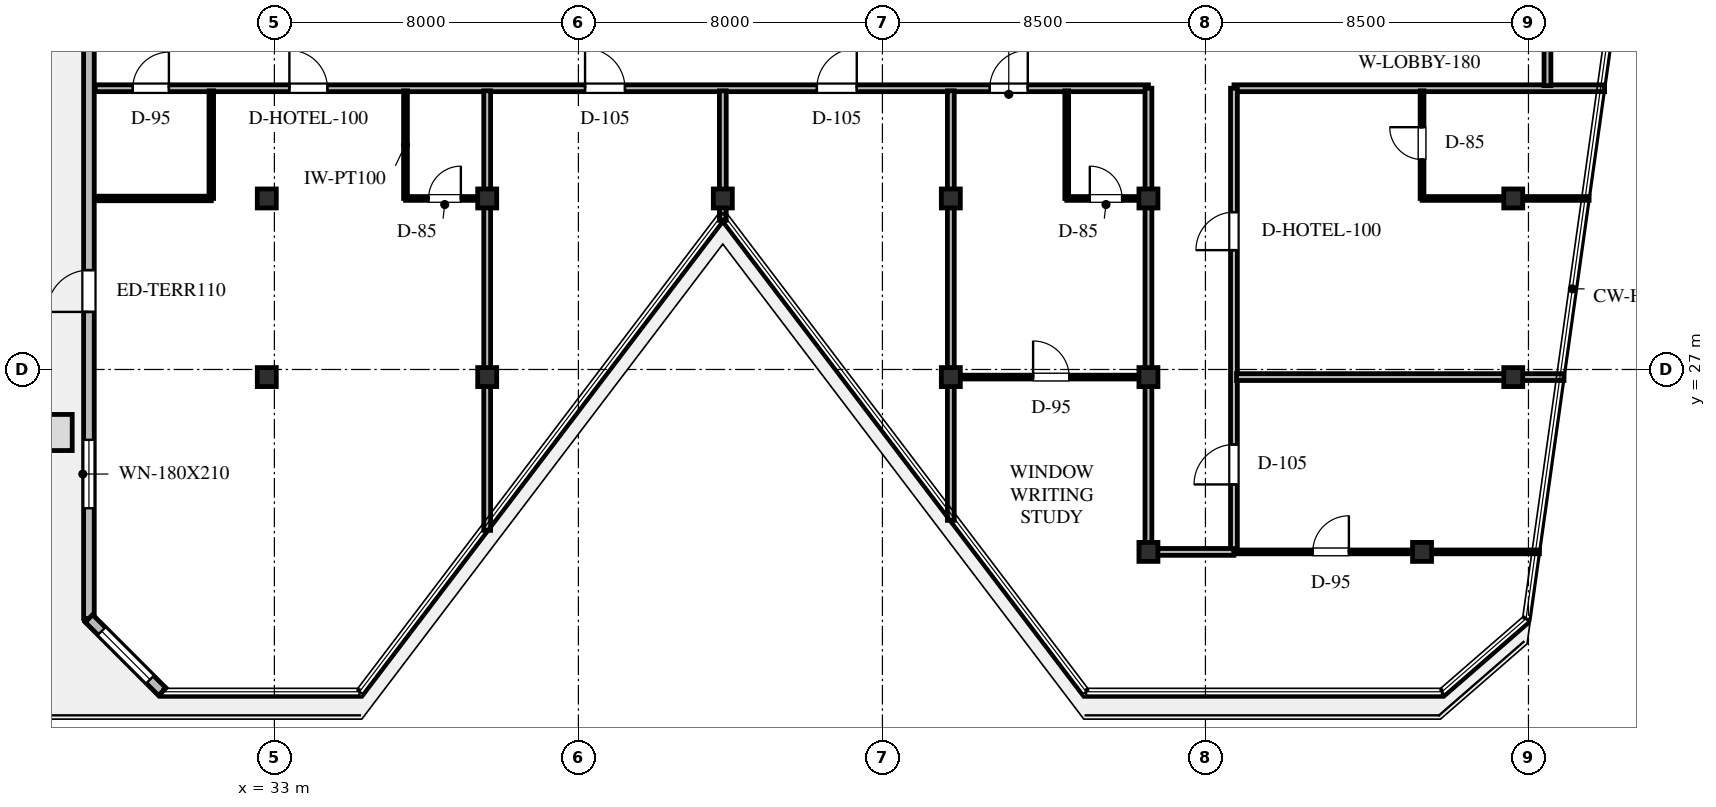
"""IFC4 building model, lengths in metres.
Left out: names, types, materials, properties, quantities, classifications, styles, units other than length and angle.
Written with IfcOpenShell. Run it as: python <this file> out.ifc"""

import sys

from ifc_helpers import new_model, si_unit, direction, frame, frame_2d, origin, origin_2d, place, context, subcontext, project, spatial, rectangle, hollow_rectangle, extrude, element, fill, save


model = new_model("IFC4")
c1 = context("Model", 3, precision=1e-05, world=origin(), true_north=direction((0.0, 1.0)))
c2 = subcontext(c1, "Body", "Model", "MODEL_VIEW")
j1 = project(units=[si_unit("LENGTHUNIT", "METRE"), si_unit("PLANEANGLEUNIT", "RADIAN")], contexts=[c1])
p1 = place(None, origin())
s1 = spatial("IfcSite", under=j1, at=p1, CompositionType="ELEMENT")
p2 = place(p1, origin())
s2 = spatial("IfcBuilding", under=s1, at=p2, CompositionType="ELEMENT")
p3 = place(p2, frame((0.0, 0.0, 263.4)))
s3 = spatial("IfcBuildingStorey", under=s2, at=p3, CompositionType="ELEMENT", Elevation=263.4)
for number, where, z_axis, x_axis in (
    (1, (44.8, 31.5, 0.0), (0.0, 0.0, 1.0), (1.0, 0.0, 0.0)),
    (2, (50.8, 31.5, 0.0), (0.0, 0.0, 1.0), (1.0, 0.0, 0.0)),
    (3, (56.0, 31.5, 0.0), (0.0, 0.0, 1.0), (1.0, 0.0, 0.0)),
    (4, (65.6, 31.5, 0.0), (0.0, 0.0, 1.0), (1.0, 0.0, 0.0)),
    (5, (38.6, 31.5, 0.0), (0.0, 0.0, 1.0), (1.0, 0.0, 0.0)),
    (6, (32.8, 31.5, 0.0), (0.0, 0.0, 1.0), (1.0, 0.0, 0.0)),
    (7, (38.6, 26.8, 0.0), (0.0, 0.0, 1.0), (1.0, 0.0, 0.0)),
    (8, (50.8, 26.8, 0.0), (0.0, 0.0, 1.0), (1.0, 0.0, 0.0)),
    (9, (56.0, 26.8, 0.0), (0.0, 0.0, 1.0), (1.0, 0.0, 0.0)),
    (10, (65.6, 26.8, 0.0), (0.0, 0.0, 1.0), (1.0, 0.0, 0.0)),
    (11, (56.0, 22.2, 0.0), (0.0, 0.0, 1.0), (1.0, 0.0, 0.0)),
    (12, (63.2, 22.2, 0.0), (0.0, 0.0, 1.0), (1.0, 0.0, 0.0)),
    (13, (32.8, 26.8, 0.0), (0.0, 0.0, 1.0), (1.0, 0.0, 0.0)),
):
    element("IfcColumn", number, at=place(p3, frame(where, z_axis=z_axis, x_axis=x_axis)), inside=s3, PredefinedType="COLUMN", context=c2, shape_type="SweptSolid", body=[
        extrude(hollow_rectangle(XDim=0.5, YDim=0.5, WallThickness=0.02, at=origin_2d()), origin(), (0.0, 0.0, 1.0), 3.6),
    ])
p4 = place(p3, frame((28.12, 20.45, 0.0), z_axis=(0.0, 0.0, 1.0), x_axis=(0.0, 1.0, 0.0)))
e14 = element("IfcWall", 14, at=p4, inside=s3, PredefinedType="STANDARD", context=c2, shape_type="SweptSolid", body=[
    extrude(rectangle(XDim=17.35, YDim=0.28, at=frame_2d((8.675, 0.0))), origin(), (0.0, 0.0, 1.0), 3.36),
])
p5 = place(p4, frame((8.065, 0.0, 0.0)))
e15 = element("IfcOpeningElement", 15, at=p5, cuts=e14, PredefinedType="OPENING", context=c2, shape_type="SweptSolid", body=[
    extrude(rectangle(XDim=1.1, YDim=2.2, at=frame_2d((0.55, 1.1))), frame((0.0, 0.15, 0.0), z_axis=(0.0, -1.0, 0.0), x_axis=(1.0, 0.0, 0.0)), (0.0, 0.0, 1.0), 0.3),
])
p6 = place(p4, frame((2.899, 0.0, 0.65)))
e16 = element("IfcOpeningElement", 16, at=p6, cuts=e14, PredefinedType="OPENING", context=c2, shape_type="SweptSolid", body=[
    extrude(rectangle(XDim=1.8, YDim=2.1, at=frame_2d((0.9, 1.05))), frame((0.0, 0.15, 0.0), z_axis=(0.0, -1.0, 0.0), x_axis=(1.0, 0.0, 0.0)), (0.0, 0.0, 1.0), 0.3),
])
p7 = place(p3, frame((30.05, 18.52, 0.0), z_axis=(0.0, 0.0, 1.0), x_axis=(-0.707106781187, 0.707106781187, 0.0)))
e17 = element("IfcWall", 17, at=p7, inside=s3, PredefinedType="STANDARD", context=c2, shape_type="SweptSolid", body=[
    extrude(rectangle(XDim=2.729, YDim=0.28, at=frame_2d((1.365, 0.0))), origin(), (0.0, 0.0, 1.0), 3.36),
])
p8 = place(p7, frame((0.455, 0.0, 0.65)))
e18 = element("IfcOpeningElement", 18, at=p8, cuts=e17, PredefinedType="OPENING", context=c2, shape_type="SweptSolid", body=[
    extrude(rectangle(XDim=1.8, YDim=2.1, at=frame_2d((0.9, 1.05))), frame((0.0, 0.15, 0.0), z_axis=(0.0, -1.0, 0.0), x_axis=(1.0, 0.0, 0.0)), (0.0, 0.0, 1.0), 0.3),
])
p9 = place(p3, frame((28.285, 34.4, 0.0), z_axis=(0.0, 0.0, 1.0), x_axis=(1.0, 0.0, 0.0)))
e19 = element("IfcWall", 19, at=p9, inside=s3, PredefinedType="STANDARD", context=c2, shape_type="SweptSolid", body=[
    extrude(rectangle(XDim=27.715, YDim=0.18, at=frame_2d((13.857, 0.0))), origin(), (0.0, 0.0, 1.0), 2.664),
])
p10 = place(p9, frame((0.989, 0.0, 0.0)))
e20 = element("IfcOpeningElement", 20, at=p10, cuts=e19, PredefinedType="OPENING", context=c2, shape_type="SweptSolid", body=[
    extrude(rectangle(XDim=0.95, YDim=2.15, at=frame_2d((0.475, 1.075))), frame((0.0, 0.1, 0.0), z_axis=(0.0, -1.0, 0.0), x_axis=(1.0, 0.0, 0.0)), (0.0, 0.0, 1.0), 0.2),
])
p11 = place(p9, frame((5.11, 0.0, 0.0)))
e21 = element("IfcOpeningElement", 21, at=p11, cuts=e19, PredefinedType="OPENING", context=c2, shape_type="SweptSolid", body=[
    extrude(rectangle(XDim=1.0, YDim=2.15, at=frame_2d((0.5, 1.075))), frame((0.0, 0.1, 0.0), z_axis=(0.0, -1.0, 0.0), x_axis=(1.0, 0.0, 0.0)), (0.0, 0.0, 1.0), 0.2),
])
p12 = place(p9, frame((12.89, 0.0, 0.0)))
e22 = element("IfcOpeningElement", 22, at=p12, cuts=e19, PredefinedType="OPENING", context=c2, shape_type="SweptSolid", body=[
    extrude(rectangle(XDim=1.05, YDim=2.2, at=frame_2d((0.525, 1.1))), frame((0.0, 0.1, 0.0), z_axis=(0.0, -1.0, 0.0), x_axis=(1.0, 0.0, 0.0)), (0.0, 0.0, 1.0), 0.2),
])
p13 = place(p9, frame((18.99, 0.0, 0.0)))
e23 = element("IfcOpeningElement", 23, at=p13, cuts=e19, PredefinedType="OPENING", context=c2, shape_type="SweptSolid", body=[
    extrude(rectangle(XDim=1.05, YDim=2.2, at=frame_2d((0.525, 1.1))), frame((0.0, 0.1, 0.0), z_axis=(0.0, -1.0, 0.0), x_axis=(1.0, 0.0, 0.0)), (0.0, 0.0, 1.0), 0.2),
])
p14 = place(p9, frame((23.54, 0.0, 0.0)))
e24 = element("IfcOpeningElement", 24, at=p14, cuts=e19, PredefinedType="OPENING", context=c2, shape_type="SweptSolid", body=[
    extrude(rectangle(XDim=1.0, YDim=2.15, at=frame_2d((0.5, 1.075))), frame((0.0, 0.1, 0.0), z_axis=(0.0, -1.0, 0.0), x_axis=(1.0, 0.0, 0.0)), (0.0, 0.0, 1.0), 0.2),
])
p15 = place(p3, frame((58.25, 34.4, 0.0), z_axis=(0.0, 0.0, 1.0), x_axis=(1.0, 0.0, 0.0)))
e25 = element("IfcWall", 25, at=p15, inside=s3, PredefinedType="STANDARD", context=c2, shape_type="SweptSolid", body=[
    extrude(rectangle(XDim=9.753, YDim=0.18, at=frame_2d((4.877, 0.0))), origin(), (0.0, 0.0, 1.0), 3.36),
])
p16 = place(p3, frame((66.5, 34.468, 0.0), z_axis=(0.0, 0.0, 1.0), x_axis=(0.0, 1.0, 0.0)))
e26 = element("IfcWall", 26, at=p16, inside=s3, PredefinedType="STANDARD", context=c2, shape_type="SweptSolid", body=[
    extrude(rectangle(XDim=3.582, YDim=0.18, at=frame_2d((1.791, 0.0))), origin(), (0.0, 0.0, 1.0), 2.664),
])
p17 = place(p3, frame((56.0, 22.2, 0.0), z_axis=(0.0, 0.0, 1.0), x_axis=(0.0, 1.0, 0.0)))
e27 = element("IfcWall", 27, at=p17, inside=s3, PredefinedType="STANDARD", context=c2, shape_type="SweptSolid", body=[
    extrude(rectangle(XDim=12.2, YDim=0.18, at=frame_2d((6.1, 0.0))), origin(), (0.0, 0.0, 1.0), 2.664),
])
p18 = place(p3, frame((58.25, 22.2, 0.0), z_axis=(0.0, 0.0, 1.0), x_axis=(0.0, 1.0, 0.0)))
e28 = element("IfcWall", 28, at=p18, inside=s3, PredefinedType="STANDARD", context=c2, shape_type="SweptSolid", body=[
    extrude(rectangle(XDim=12.2, YDim=0.18, at=frame_2d((6.1, 0.0))), origin(), (0.0, 0.0, 1.0), 2.664),
])
p19 = place(p18, frame((1.775, 0.0, 0.0)))
e29 = element("IfcOpeningElement", 29, at=p19, cuts=e28, PredefinedType="OPENING", context=c2, shape_type="SweptSolid", body=[
    extrude(rectangle(XDim=1.05, YDim=2.2, at=frame_2d((0.525, 1.1))), frame((0.0, 0.1, 0.0), z_axis=(0.0, -1.0, 0.0), x_axis=(1.0, 0.0, 0.0)), (0.0, 0.0, 1.0), 0.2),
])
p20 = place(p18, frame((7.94, 0.0, 0.0)))
e30 = element("IfcOpeningElement", 30, at=p20, cuts=e28, PredefinedType="OPENING", context=c2, shape_type="SweptSolid", body=[
    extrude(rectangle(XDim=1.0, YDim=2.15, at=frame_2d((0.5, 1.075))), frame((0.0, 0.1, 0.0), z_axis=(0.0, -1.0, 0.0), x_axis=(1.0, 0.0, 0.0)), (0.0, 0.0, 1.0), 0.2),
])
p21 = place(p3, frame((56.0, 22.2, 0.0), z_axis=(0.0, 0.0, 1.0), x_axis=(1.0, 0.0, 0.0)))
e31 = element("IfcWall", 31, at=p21, inside=s3, PredefinedType="STANDARD", context=c2, shape_type="SweptSolid", body=[
    extrude(rectangle(XDim=2.25, YDim=0.18, at=frame_2d((1.125, 0.0))), origin(), (0.0, 0.0, 1.0), 2.664),
])
p22 = place(p3, frame((31.34, 31.5, 0.0), z_axis=(0.0, 0.0, 1.0), x_axis=(0.0, 1.0, 0.0)))
e32 = element("IfcWall", 32, at=p22, inside=s3, PredefinedType="PARTITIONING", context=c2, shape_type="SweptSolid", body=[
    extrude(rectangle(XDim=2.832, YDim=0.12, at=frame_2d((1.416, 0.0))), origin(), (0.0, 0.0, 1.0), 3.36),
])
p23 = place(p3, frame((28.285, 31.5, 0.0), z_axis=(0.0, 0.0, 1.0), x_axis=(1.0, 0.0, 0.0)))
e33 = element("IfcWall", 33, at=p23, inside=s3, PredefinedType="PARTITIONING", context=c2, shape_type="SweptSolid", body=[
    extrude(rectangle(XDim=3.055, YDim=0.12, at=frame_2d((1.528, 0.0))), origin(), (0.0, 0.0, 1.0), 3.36),
])
p24 = place(p3, frame((58.318, 26.8, 0.0), z_axis=(0.0, 0.0, 1.0), x_axis=(1.0, 0.0, 0.0)))
e34 = element("IfcWall", 34, at=p24, inside=s3, PredefinedType="STANDARD", context=c2, shape_type="SweptSolid", body=[
    extrude(rectangle(XDim=8.617, YDim=0.18, at=frame_2d((4.309, 0.0))), origin(), (0.0, 0.0, 1.0), 2.664),
])
p25 = place(p3, frame((58.25, 22.2, 0.0), z_axis=(0.0, 0.0, 1.0), x_axis=(1.0, 0.0, 0.0)))
e35 = element("IfcWall", 35, at=p25, inside=s3, PredefinedType="PARTITIONING", context=c2, shape_type="SweptSolid", body=[
    extrude(rectangle(XDim=8.039, YDim=0.1, at=frame_2d((4.02, 0.0))), origin(), (0.0, 0.0, 1.0), 2.664),
])
p26 = place(p25, frame((2.075, 0.0, 0.0)))
e36 = element("IfcOpeningElement", 36, at=p26, cuts=e35, PredefinedType="OPENING", context=c2, shape_type="SweptSolid", body=[
    extrude(rectangle(XDim=0.95, YDim=2.15, at=frame_2d((0.475, 1.075))), frame((0.0, 0.06, 0.0), z_axis=(0.0, -1.0, 0.0), x_axis=(1.0, 0.0, 0.0)), (0.0, 0.0, 1.0), 0.12),
])
p27 = place(p3, frame((63.2, 31.5, 0.0), z_axis=(0.0, 0.0, 1.0), x_axis=(1.0, 0.0, 0.0)))
e37 = element("IfcWall", 37, at=p27, inside=s3, PredefinedType="PARTITIONING", context=c2, shape_type="SweptSolid", body=[
    extrude(rectangle(XDim=4.396, YDim=0.1, at=frame_2d((2.198, 0.0))), origin(), (0.0, 0.0, 1.0), 2.664),
])
p28 = place(p3, frame((63.2, 31.5, 0.0), z_axis=(0.0, 0.0, 1.0), x_axis=(0.0, 1.0, 0.0)))
e38 = element("IfcWall", 38, at=p28, inside=s3, PredefinedType="PARTITIONING", context=c2, shape_type="SweptSolid", body=[
    extrude(rectangle(XDim=2.832, YDim=0.1, at=frame_2d((1.416, 0.0))), origin(), (0.0, 0.0, 1.0), 2.664),
])
p29 = place(p28, frame((1.025, 0.0, 0.0)))
e39 = element("IfcOpeningElement", 39, at=p29, cuts=e38, PredefinedType="OPENING", context=c2, shape_type="SweptSolid", body=[
    extrude(rectangle(XDim=0.85, YDim=2.1, at=frame_2d((0.425, 1.05))), frame((0.0, 0.06, 0.0), z_axis=(0.0, -1.0, 0.0), x_axis=(1.0, 0.0, 0.0)), (0.0, 0.0, 1.0), 0.12),
])
p30 = place(p3, frame((36.45, 31.5, 0.0), z_axis=(0.0, 0.0, 1.0), x_axis=(0.0, 1.0, 0.0)))
e40 = element("IfcWall", 40, at=p30, inside=s3, PredefinedType="PARTITIONING", context=c2, shape_type="SweptSolid", body=[
    extrude(rectangle(XDim=2.832, YDim=0.1, at=frame_2d((1.416, 0.0))), origin(), (0.0, 0.0, 1.0), 2.664),
])
p31 = place(p3, frame((36.45, 31.5, 0.0), z_axis=(0.0, 0.0, 1.0), x_axis=(1.0, 0.0, 0.0)))
e41 = element("IfcWall", 41, at=p31, inside=s3, PredefinedType="PARTITIONING", context=c2, shape_type="SweptSolid", body=[
    extrude(rectangle(XDim=2.082, YDim=0.1, at=frame_2d((1.041, 0.0))), origin(), (0.0, 0.0, 1.0), 2.664),
])
p32 = place(p31, frame((0.607, 0.0, 0.0)))
e42 = element("IfcOpeningElement", 42, at=p32, cuts=e41, PredefinedType="OPENING", context=c2, shape_type="SweptSolid", body=[
    extrude(rectangle(XDim=0.85, YDim=2.1, at=frame_2d((0.425, 1.05))), frame((0.0, 0.06, 0.0), z_axis=(0.0, -1.0, 0.0), x_axis=(1.0, 0.0, 0.0)), (0.0, 0.0, 1.0), 0.12),
])
p33 = place(p3, frame((38.6, 22.767, 0.0), z_axis=(0.0, 0.0, 1.0), x_axis=(0.0, 1.0, 0.0)))
e43 = element("IfcWall", 43, at=p33, inside=s3, PredefinedType="STANDARD", context=c2, shape_type="SweptSolid", body=[
    extrude(rectangle(XDim=11.565, YDim=0.18, at=frame_2d((5.783, 0.0))), origin(), (0.0, 0.0, 1.0), 2.664),
])
p34 = place(p3, frame((44.8, 30.925, 0.0), z_axis=(0.0, 0.0, 1.0), x_axis=(0.0, 1.0, 0.0)))
e44 = element("IfcWall", 44, at=p34, inside=s3, PredefinedType="STANDARD", context=c2, shape_type="SweptSolid", body=[
    extrude(rectangle(XDim=3.407, YDim=0.18, at=frame_2d((1.704, 0.0))), origin(), (0.0, 0.0, 1.0), 2.664),
])
p35 = place(p3, frame((50.8, 23.03, 0.0), z_axis=(0.0, 0.0, 1.0), x_axis=(0.0, 1.0, 0.0)))
e45 = element("IfcWall", 45, at=p35, inside=s3, PredefinedType="STANDARD", context=c2, shape_type="SweptSolid", body=[
    extrude(rectangle(XDim=11.302, YDim=0.18, at=frame_2d((5.651, 0.0))), origin(), (0.0, 0.0, 1.0), 2.664),
])
p36 = place(p3, frame((50.868, 26.8, 0.0), z_axis=(0.0, 0.0, 1.0), x_axis=(1.0, 0.0, 0.0)))
e46 = element("IfcWall", 46, at=p36, inside=s3, PredefinedType="PARTITIONING", context=c2, shape_type="SweptSolid", body=[
    extrude(rectangle(XDim=5.064, YDim=0.1, at=frame_2d((2.532, 0.0))), origin(), (0.0, 0.0, 1.0), 2.664),
])
p37 = place(p36, frame((2.097, 0.0, 0.0)))
e47 = element("IfcOpeningElement", 47, at=p37, cuts=e46, PredefinedType="OPENING", context=c2, shape_type="SweptSolid", body=[
    extrude(rectangle(XDim=0.95, YDim=2.15, at=frame_2d((0.475, 1.075))), frame((0.0, 0.06, 0.0), z_axis=(0.0, -1.0, 0.0), x_axis=(1.0, 0.0, 0.0)), (0.0, 0.0, 1.0), 0.12),
])
p38 = place(p3, frame((53.85, 31.5, 0.0), z_axis=(0.0, 0.0, 1.0), x_axis=(0.0, 1.0, 0.0)))
e48 = element("IfcWall", 48, at=p38, inside=s3, PredefinedType="PARTITIONING", context=c2, shape_type="SweptSolid", body=[
    extrude(rectangle(XDim=2.832, YDim=0.1, at=frame_2d((1.416, 0.0))), origin(), (0.0, 0.0, 1.0), 2.664),
])
p39 = place(p3, frame((53.85, 31.5, 0.0), z_axis=(0.0, 0.0, 1.0), x_axis=(1.0, 0.0, 0.0)))
e49 = element("IfcWall", 49, at=p39, inside=s3, PredefinedType="PARTITIONING", context=c2, shape_type="SweptSolid", body=[
    extrude(rectangle(XDim=2.082, YDim=0.1, at=frame_2d((1.041, 0.0))), origin(), (0.0, 0.0, 1.0), 2.664),
])
p40 = place(p39, frame((0.607, 0.0, 0.0)))
e50 = element("IfcOpeningElement", 50, at=p40, cuts=e49, PredefinedType="OPENING", context=c2, shape_type="SweptSolid", body=[
    extrude(rectangle(XDim=0.85, YDim=2.1, at=frame_2d((0.425, 1.05))), frame((0.0, 0.06, 0.0), z_axis=(0.0, -1.0, 0.0), x_axis=(1.0, 0.0, 0.0)), (0.0, 0.0, 1.0), 0.12),
])
p41 = place(p5, origin())
e51 = element("IfcDoor", 51, at=p41, inside=s3, OperationType="SINGLE_SWING_LEFT", PredefinedType="DOOR", context=c2, shape_type="SweptSolid", body=[
    extrude(rectangle(XDim=1.1, YDim=2.2, at=frame_2d((0.55, 1.1))), frame((0.0, 0.025, 0.0), z_axis=(0.0, -1.0, 0.0), x_axis=(1.0, 0.0, 0.0)), (0.0, 0.0, 1.0), 0.05),
])
fill(e15, e51)
p42 = place(p6, origin())
e52 = element("IfcWindow", 52, at=p42, inside=s3, PartitioningType="SINGLE_PANEL", PredefinedType="WINDOW", context=c2, shape_type="SweptSolid", body=[
    extrude(rectangle(XDim=1.8, YDim=2.1, at=frame_2d((0.9, 1.05))), frame((0.0, 0.03, 0.0), z_axis=(0.0, -1.0, 0.0), x_axis=(1.0, 0.0, 0.0)), (0.0, 0.0, 1.0), 0.06),
])
fill(e16, e52)
p43 = place(p8, origin())
e53 = element("IfcWindow", 53, at=p43, inside=s3, PartitioningType="SINGLE_PANEL", PredefinedType="WINDOW", context=c2, shape_type="SweptSolid", body=[
    extrude(rectangle(XDim=1.8, YDim=2.1, at=frame_2d((0.9, 1.05))), frame((0.0, 0.03, 0.0), z_axis=(0.0, -1.0, 0.0), x_axis=(1.0, 0.0, 0.0)), (0.0, 0.0, 1.0), 0.06),
])
fill(e18, e53)
p44 = place(p10, origin())
e54 = element("IfcDoor", 54, at=p44, inside=s3, OperationType="SINGLE_SWING_RIGHT", PredefinedType="DOOR", context=c2, shape_type="SweptSolid", body=[
    extrude(rectangle(XDim=0.95, YDim=2.15, at=frame_2d((0.475, 1.075))), frame((0.0, 0.025, 0.0), z_axis=(0.0, -1.0, 0.0), x_axis=(1.0, 0.0, 0.0)), (0.0, 0.0, 1.0), 0.05),
])
fill(e20, e54)
p45 = place(p19, origin())
e55 = element("IfcDoor", 55, at=p45, inside=s3, OperationType="SINGLE_SWING_LEFT", PredefinedType="DOOR", context=c2, shape_type="SweptSolid", body=[
    extrude(rectangle(XDim=1.05, YDim=2.2, at=frame_2d((0.525, 1.1))), frame((0.0, 0.025, 0.0), z_axis=(0.0, -1.0, 0.0), x_axis=(1.0, 0.0, 0.0)), (0.0, 0.0, 1.0), 0.05),
])
fill(e29, e55)
p46 = place(p26, origin())
e56 = element("IfcDoor", 56, at=p46, inside=s3, OperationType="SINGLE_SWING_RIGHT", PredefinedType="DOOR", context=c2, shape_type="SweptSolid", body=[
    extrude(rectangle(XDim=0.95, YDim=2.15, at=frame_2d((0.475, 1.075))), frame((0.0, 0.025, 0.0), z_axis=(0.0, -1.0, 0.0), x_axis=(1.0, 0.0, 0.0)), (0.0, 0.0, 1.0), 0.05),
])
fill(e36, e56)
p47 = place(p20, origin())
e57 = element("IfcDoor", 57, at=p47, inside=s3, OperationType="SINGLE_SWING_LEFT", PredefinedType="DOOR", context=c2, shape_type="SweptSolid", body=[
    extrude(rectangle(XDim=1.0, YDim=2.15, at=frame_2d((0.5, 1.075))), frame((0.0, 0.025, 0.0), z_axis=(0.0, -1.0, 0.0), x_axis=(1.0, 0.0, 0.0)), (0.0, 0.0, 1.0), 0.05),
])
fill(e30, e57)
p48 = place(p29, origin())
e58 = element("IfcDoor", 58, at=p48, inside=s3, OperationType="SINGLE_SWING_RIGHT", PredefinedType="DOOR", context=c2, shape_type="SweptSolid", body=[
    extrude(rectangle(XDim=0.85, YDim=2.1, at=frame_2d((0.425, 1.05))), frame((0.0, 0.025, 0.0), z_axis=(0.0, -1.0, 0.0), x_axis=(1.0, 0.0, 0.0)), (0.0, 0.0, 1.0), 0.05),
])
fill(e39, e58)
p49 = place(p11, origin())
e59 = element("IfcDoor", 59, at=p49, inside=s3, OperationType="SINGLE_SWING_LEFT", PredefinedType="DOOR", context=c2, shape_type="SweptSolid", body=[
    extrude(rectangle(XDim=1.0, YDim=2.15, at=frame_2d((0.5, 1.075))), frame((0.0, 0.025, 0.0), z_axis=(0.0, -1.0, 0.0), x_axis=(1.0, 0.0, 0.0)), (0.0, 0.0, 1.0), 0.05),
])
fill(e21, e59)
p50 = place(p32, origin())
e60 = element("IfcDoor", 60, at=p50, inside=s3, OperationType="SINGLE_SWING_RIGHT", PredefinedType="DOOR", context=c2, shape_type="SweptSolid", body=[
    extrude(rectangle(XDim=0.85, YDim=2.1, at=frame_2d((0.425, 1.05))), frame((0.0, 0.025, 0.0), z_axis=(0.0, -1.0, 0.0), x_axis=(1.0, 0.0, 0.0)), (0.0, 0.0, 1.0), 0.05),
])
fill(e42, e60)
p51 = place(p12, origin())
e61 = element("IfcDoor", 61, at=p51, inside=s3, OperationType="SINGLE_SWING_LEFT", PredefinedType="DOOR", context=c2, shape_type="SweptSolid", body=[
    extrude(rectangle(XDim=1.05, YDim=2.2, at=frame_2d((0.525, 1.1))), frame((0.0, 0.025, 0.0), z_axis=(0.0, -1.0, 0.0), x_axis=(1.0, 0.0, 0.0)), (0.0, 0.0, 1.0), 0.05),
])
fill(e22, e61)
p52 = place(p13, origin())
e62 = element("IfcDoor", 62, at=p52, inside=s3, OperationType="SINGLE_SWING_RIGHT", PredefinedType="DOOR", context=c2, shape_type="SweptSolid", body=[
    extrude(rectangle(XDim=1.05, YDim=2.2, at=frame_2d((0.525, 1.1))), frame((0.0, 0.025, 0.0), z_axis=(0.0, -1.0, 0.0), x_axis=(1.0, 0.0, 0.0)), (0.0, 0.0, 1.0), 0.05),
])
fill(e23, e62)
p53 = place(p37, origin())
e63 = element("IfcDoor", 63, at=p53, inside=s3, OperationType="SINGLE_SWING_LEFT", PredefinedType="DOOR", context=c2, shape_type="SweptSolid", body=[
    extrude(rectangle(XDim=0.95, YDim=2.15, at=frame_2d((0.475, 1.075))), frame((0.0, 0.025, 0.0), z_axis=(0.0, -1.0, 0.0), x_axis=(1.0, 0.0, 0.0)), (0.0, 0.0, 1.0), 0.05),
])
fill(e47, e63)
p54 = place(p14, origin())
e64 = element("IfcDoor", 64, at=p54, inside=s3, OperationType="SINGLE_SWING_RIGHT", PredefinedType="DOOR", context=c2, shape_type="SweptSolid", body=[
    extrude(rectangle(XDim=1.0, YDim=2.15, at=frame_2d((0.5, 1.075))), frame((0.0, 0.025, 0.0), z_axis=(0.0, -1.0, 0.0), x_axis=(1.0, 0.0, 0.0)), (0.0, 0.0, 1.0), 0.05),
])
fill(e24, e64)
p55 = place(p40, origin())
e65 = element("IfcDoor", 65, at=p55, inside=s3, OperationType="SINGLE_SWING_LEFT", PredefinedType="DOOR", context=c2, shape_type="SweptSolid", body=[
    extrude(rectangle(XDim=0.85, YDim=2.1, at=frame_2d((0.425, 1.05))), frame((0.0, 0.025, 0.0), z_axis=(0.0, -1.0, 0.0), x_axis=(1.0, 0.0, 0.0)), (0.0, 0.0, 1.0), 0.05),
])
fill(e50, e65)
save(model, sys.argv[1])
